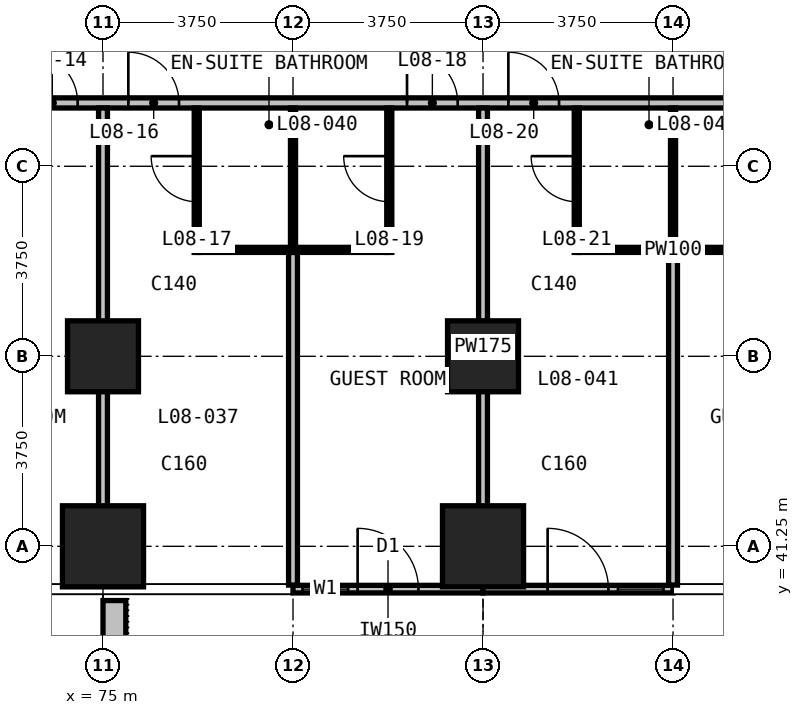
"""IFC4 building model, lengths in metres.
Left out: names, types, materials, properties, quantities, classifications, styles, units other than length and angle.
Written with IfcOpenShell. Run it as: python <this file> out.ifc"""

import sys

from ifc_helpers import new_model, si_unit, direction, frame, frame_2d, origin, origin_2d, place, context, subcontext, project, spatial, rectangle, extrude, element, fill, save


model = new_model("IFC4")
c1 = context("Model", 3, precision=1e-05, world=origin(), true_north=direction((0.0, 1.0)))
c2 = subcontext(c1, "Body", "Model", "MODEL_VIEW")
j1 = project(units=[si_unit("LENGTHUNIT", "METRE"), si_unit("PLANEANGLEUNIT", "RADIAN")], contexts=[c1])
p1 = place(None, origin())
s1 = spatial("IfcSite", under=j1, at=p1, CompositionType="ELEMENT")
p2 = place(p1, origin())
s2 = spatial("IfcBuilding", under=s1, at=p2, CompositionType="ELEMENT")
p3 = place(p2, frame((0.0, 0.0, 46.1)))
s3 = spatial("IfcBuildingStorey", under=s2, at=p3, CompositionType="ELEMENT", Elevation=46.1)
p4 = place(p3, frame((75.0, 41.25, 0.0), z_axis=(0.0, 0.0, 1.0), x_axis=(1.0, 0.0, 0.0)))
e1 = element("IfcColumn", 1, at=p4, inside=s3, PredefinedType="COLUMN", context=c2, shape_type="SweptSolid", body=[
    extrude(rectangle(XDim=1.6, YDim=1.6, at=origin_2d()), origin(), (0.0, 0.0, 1.0), 3.3),
])
p5 = place(p3, frame((75.0, 45.0, 0.0), z_axis=(0.0, 0.0, 1.0), x_axis=(1.0, 0.0, 0.0)))
e2 = element("IfcColumn", 2, at=p5, inside=s3, PredefinedType="COLUMN", context=c2, shape_type="SweptSolid", body=[
    extrude(rectangle(XDim=1.4, YDim=1.4, at=origin_2d()), origin(), (0.0, 0.0, 1.0), 3.3),
])
p6 = place(p3, frame((82.5, 41.25, 0.0), z_axis=(0.0, 0.0, 1.0), x_axis=(1.0, 0.0, 0.0)))
e3 = element("IfcColumn", 3, at=p6, inside=s3, PredefinedType="COLUMN", context=c2, shape_type="SweptSolid", body=[
    extrude(rectangle(XDim=1.6, YDim=1.6, at=origin_2d()), origin(), (0.0, 0.0, 1.0), 3.3),
])
p7 = place(p3, frame((82.5, 45.0, 0.0), z_axis=(0.0, 0.0, 1.0), x_axis=(1.0, 0.0, 0.0)))
e4 = element("IfcColumn", 4, at=p7, inside=s3, PredefinedType="COLUMN", context=c2, shape_type="SweptSolid", body=[
    extrude(rectangle(XDim=1.4, YDim=1.4, at=origin_2d()), origin(), (0.0, 0.0, 1.0), 3.3),
])
p8 = place(p3, frame((78.75, 40.405, 0.0), z_axis=(0.0, 0.0, 1.0), x_axis=(1.0, 0.0, 0.0)))
e5 = element("IfcWall", 5, at=p8, inside=s3, PredefinedType="SOLIDWALL", context=c2, shape_type="SweptSolid", body=[
    extrude(rectangle(XDim=3.75, YDim=0.15, at=frame_2d((1.875, 0.0))), origin(), (0.0, 0.0, 1.0), 3.0),
])
p9 = place(p8, frame((0.188, 0.0, 0.1)))
e6 = element("IfcOpeningElement", 6, at=p9, cuts=e5, PredefinedType="OPENING", context=c2, shape_type="SweptSolid", body=[
    extrude(rectangle(XDim=0.9, YDim=2.4, at=frame_2d((0.45, 1.2))), frame((0.0, 0.085, 0.0), z_axis=(0.0, -1.0, 0.0), x_axis=(1.0, 0.0, 0.0)), (0.0, 0.0, 1.0), 0.17),
])
p10 = place(p8, frame((1.275, 0.0, 0.0)))
e7 = element("IfcOpeningElement", 7, at=p10, cuts=e5, PredefinedType="OPENING", context=c2, shape_type="SweptSolid", body=[
    extrude(rectangle(XDim=1.2, YDim=2.4, at=frame_2d((0.6, 1.2))), frame((0.0, 0.085, 0.0), z_axis=(0.0, -1.0, 0.0), x_axis=(1.0, 0.0, 0.0)), (0.0, 0.0, 1.0), 0.17),
])
p11 = place(p3, frame((82.5, 40.405, 0.0), z_axis=(0.0, 0.0, 1.0), x_axis=(1.0, 0.0, 0.0)))
e8 = element("IfcWall", 8, at=p11, inside=s3, PredefinedType="SOLIDWALL", context=c2, shape_type="SweptSolid", body=[
    extrude(rectangle(XDim=3.75, YDim=0.15, at=frame_2d((1.875, 0.0))), origin(), (0.0, 0.0, 1.0), 3.0),
])
p12 = place(p11, frame((1.275, 0.0, 0.0)))
e9 = element("IfcOpeningElement", 9, at=p12, cuts=e8, PredefinedType="OPENING", context=c2, shape_type="SweptSolid", body=[
    extrude(rectangle(XDim=1.2, YDim=2.4, at=frame_2d((0.6, 1.2))), frame((0.0, 0.085, 0.0), z_axis=(0.0, -1.0, 0.0), x_axis=(1.0, 0.0, 0.0)), (0.0, 0.0, 1.0), 0.17),
])
p13 = place(p11, frame((2.663, 0.0, 0.1)))
e10 = element("IfcOpeningElement", 10, at=p13, cuts=e8, PredefinedType="OPENING", context=c2, shape_type="SweptSolid", body=[
    extrude(rectangle(XDim=0.9, YDim=2.4, at=frame_2d((0.45, 1.2))), frame((0.0, 0.085, 0.0), z_axis=(0.0, -1.0, 0.0), x_axis=(1.0, 0.0, 0.0)), (0.0, 0.0, 1.0), 0.17),
])
p14 = place(p3, frame((75.225, 40.18, 0.0), z_axis=(0.0, 0.0, 1.0), x_axis=(0.0, -1.0, 0.0)))
e11 = element("IfcWall", 11, at=p14, inside=s3, PredefinedType="USERDEFINED", context=c2, shape_type="SweptSolid", body=[
    extrude(rectangle(XDim=2.33, YDim=0.45, at=frame_2d((1.165, 0.0))), origin(), (0.0, 0.0, 1.0), 1.1),
])
p15 = place(p3, frame((52.575, 50.0, 0.0), z_axis=(0.0, 0.0, 1.0), x_axis=(1.0, 0.0, 0.0)))
e12 = element("IfcWall", 12, at=p15, inside=s3, PredefinedType="PARTITIONING", context=c2, shape_type="SweptSolid", body=[
    extrude(rectangle(XDim=44.85, YDim=0.2, at=frame_2d((22.425, 0.0))), origin(), (0.0, 0.0, 1.0), 3.0),
])
p16 = place(p15, frame((5.925, 0.0, 0.0)))
e13 = element("IfcOpeningElement", 13, at=p16, cuts=e12, PredefinedType="OPENING", context=c2, shape_type="SweptSolid", body=[
    extrude(rectangle(XDim=1.0, YDim=2.2, at=frame_2d((0.5, 1.1))), frame((0.0, 0.11, 0.0), z_axis=(0.0, -1.0, 0.0), x_axis=(1.0, 0.0, 0.0)), (0.0, 0.0, 1.0), 0.22),
])
p17 = place(p15, frame((7.925, 0.0, 0.0)))
e14 = element("IfcOpeningElement", 14, at=p17, cuts=e12, PredefinedType="OPENING", context=c2, shape_type="SweptSolid", body=[
    extrude(rectangle(XDim=1.0, YDim=2.2, at=frame_2d((0.5, 1.1))), frame((0.0, 0.11, 0.0), z_axis=(0.0, -1.0, 0.0), x_axis=(1.0, 0.0, 0.0)), (0.0, 0.0, 1.0), 0.22),
])
p18 = place(p15, frame((13.425, 0.0, 0.0)))
e15 = element("IfcOpeningElement", 15, at=p18, cuts=e12, PredefinedType="OPENING", context=c2, shape_type="SweptSolid", body=[
    extrude(rectangle(XDim=1.0, YDim=2.2, at=frame_2d((0.5, 1.1))), frame((0.0, 0.11, 0.0), z_axis=(0.0, -1.0, 0.0), x_axis=(1.0, 0.0, 0.0)), (0.0, 0.0, 1.0), 0.22),
])
p19 = place(p15, frame((15.425, 0.0, 0.0)))
e16 = element("IfcOpeningElement", 16, at=p19, cuts=e12, PredefinedType="OPENING", context=c2, shape_type="SweptSolid", body=[
    extrude(rectangle(XDim=1.0, YDim=2.2, at=frame_2d((0.5, 1.1))), frame((0.0, 0.11, 0.0), z_axis=(0.0, -1.0, 0.0), x_axis=(1.0, 0.0, 0.0)), (0.0, 0.0, 1.0), 0.22),
])
p20 = place(p15, frame((20.925, 0.0, 0.0)))
e17 = element("IfcOpeningElement", 17, at=p20, cuts=e12, PredefinedType="OPENING", context=c2, shape_type="SweptSolid", body=[
    extrude(rectangle(XDim=1.0, YDim=2.2, at=frame_2d((0.5, 1.1))), frame((0.0, 0.11, 0.0), z_axis=(0.0, -1.0, 0.0), x_axis=(1.0, 0.0, 0.0)), (0.0, 0.0, 1.0), 0.22),
])
p21 = place(p15, frame((22.925, 0.0, 0.0)))
e18 = element("IfcOpeningElement", 18, at=p21, cuts=e12, PredefinedType="OPENING", context=c2, shape_type="SweptSolid", body=[
    extrude(rectangle(XDim=1.0, YDim=2.2, at=frame_2d((0.5, 1.1))), frame((0.0, 0.11, 0.0), z_axis=(0.0, -1.0, 0.0), x_axis=(1.0, 0.0, 0.0)), (0.0, 0.0, 1.0), 0.22),
])
p22 = place(p15, frame((28.425, 0.0, 0.0)))
e19 = element("IfcOpeningElement", 19, at=p22, cuts=e12, PredefinedType="OPENING", context=c2, shape_type="SweptSolid", body=[
    extrude(rectangle(XDim=1.0, YDim=2.2, at=frame_2d((0.5, 1.1))), frame((0.0, 0.11, 0.0), z_axis=(0.0, -1.0, 0.0), x_axis=(1.0, 0.0, 0.0)), (0.0, 0.0, 1.0), 0.22),
])
p23 = place(p15, frame((30.425, 0.0, 0.0)))
e20 = element("IfcOpeningElement", 20, at=p23, cuts=e12, PredefinedType="OPENING", context=c2, shape_type="SweptSolid", body=[
    extrude(rectangle(XDim=1.0, YDim=2.2, at=frame_2d((0.5, 1.1))), frame((0.0, 0.11, 0.0), z_axis=(0.0, -1.0, 0.0), x_axis=(1.0, 0.0, 0.0)), (0.0, 0.0, 1.0), 0.22),
])
p24 = place(p15, frame((35.925, 0.0, 0.0)))
e21 = element("IfcOpeningElement", 21, at=p24, cuts=e12, PredefinedType="OPENING", context=c2, shape_type="SweptSolid", body=[
    extrude(rectangle(XDim=1.0, YDim=2.2, at=frame_2d((0.5, 1.1))), frame((0.0, 0.11, 0.0), z_axis=(0.0, -1.0, 0.0), x_axis=(1.0, 0.0, 0.0)), (0.0, 0.0, 1.0), 0.22),
])
p25 = place(p15, frame((37.925, 0.0, 0.0)))
e22 = element("IfcOpeningElement", 22, at=p25, cuts=e12, PredefinedType="OPENING", context=c2, shape_type="SweptSolid", body=[
    extrude(rectangle(XDim=1.0, YDim=2.2, at=frame_2d((0.5, 1.1))), frame((0.0, 0.11, 0.0), z_axis=(0.0, -1.0, 0.0), x_axis=(1.0, 0.0, 0.0)), (0.0, 0.0, 1.0), 0.22),
])
p26 = place(p15, frame((1.4, 0.0, 0.0)))
e23 = element("IfcOpeningElement", 23, at=p26, cuts=e12, PredefinedType="OPENING", context=c2, shape_type="SweptSolid", body=[
    extrude(rectangle(XDim=0.9, YDim=2.2, at=frame_2d((0.45, 1.1))), frame((0.0, 0.11, 0.0), z_axis=(0.0, -1.0, 0.0), x_axis=(1.0, 0.0, 0.0)), (0.0, 0.0, 1.0), 0.22),
])
p27 = place(p15, frame((42.575, 0.0, 0.0)))
e24 = element("IfcOpeningElement", 24, at=p27, cuts=e12, PredefinedType="OPENING", context=c2, shape_type="SweptSolid", body=[
    extrude(rectangle(XDim=0.9, YDim=2.2, at=frame_2d((0.45, 1.1))), frame((0.0, 0.11, 0.0), z_axis=(0.0, -1.0, 0.0), x_axis=(1.0, 0.0, 0.0)), (0.0, 0.0, 1.0), 0.22),
])
p28 = place(p3, frame((75.0, 40.485, 0.0), z_axis=(0.0, 0.0, 1.0), x_axis=(0.0, 1.0, 0.0)))
e25 = element("IfcWall", 25, at=p28, inside=s3, PredefinedType="PARTITIONING", context=c2, shape_type="SweptSolid", body=[
    extrude(rectangle(XDim=9.415, YDim=0.175, at=frame_2d((4.708, 0.0))), origin(), (0.0, 0.0, 1.0), 3.0),
])
p29 = place(p3, frame((78.75, 40.485, 0.0), z_axis=(0.0, 0.0, 1.0), x_axis=(0.0, 1.0, 0.0)))
e26 = element("IfcWall", 26, at=p29, inside=s3, PredefinedType="PARTITIONING", context=c2, shape_type="SweptSolid", body=[
    extrude(rectangle(XDim=6.565, YDim=0.175, at=frame_2d((3.282, 0.0))), origin(), (0.0, 0.0, 1.0), 3.0),
])
p30 = place(p3, frame((82.5, 40.485, 0.0), z_axis=(0.0, 0.0, 1.0), x_axis=(0.0, 1.0, 0.0)))
e27 = element("IfcWall", 27, at=p30, inside=s3, PredefinedType="PARTITIONING", context=c2, shape_type="SweptSolid", body=[
    extrude(rectangle(XDim=9.415, YDim=0.175, at=frame_2d((4.708, 0.0))), origin(), (0.0, 0.0, 1.0), 3.0),
])
p31 = place(p3, frame((86.25, 40.485, 0.0), z_axis=(0.0, 0.0, 1.0), x_axis=(0.0, 1.0, 0.0)))
e28 = element("IfcWall", 28, at=p31, inside=s3, PredefinedType="PARTITIONING", context=c2, shape_type="SweptSolid", body=[
    extrude(rectangle(XDim=6.565, YDim=0.175, at=frame_2d((3.282, 0.0))), origin(), (0.0, 0.0, 1.0), 3.0),
])
for number, where, z_axis, x_axis in (
    (29, (76.9, 47.1, 0.0), (0.0, 0.0, 1.0), (1.0, 0.0, 0.0)),
    (30, (84.4, 47.1, 0.0), (0.0, 0.0, 1.0), (1.0, 0.0, 0.0)),
):
    element("IfcWall", number, at=place(p3, frame(where, z_axis=z_axis, x_axis=x_axis)), inside=s3, PredefinedType="PARTITIONING", context=c2, shape_type="SweptSolid", body=[
        extrude(rectangle(XDim=3.7, YDim=0.1, at=frame_2d((1.85, 0.0))), origin(), (0.0, 0.0, 1.0), 3.0),
    ])
p32 = place(p3, frame((76.85, 47.05, 0.0), z_axis=(0.0, 0.0, 1.0), x_axis=(0.0, 1.0, 0.0)))
e31 = element("IfcWall", 31, at=p32, inside=s3, PredefinedType="PARTITIONING", context=c2, shape_type="SweptSolid", body=[
    extrude(rectangle(XDim=2.85, YDim=0.1, at=frame_2d((1.425, 0.0))), origin(), (0.0, 0.0, 1.0), 3.0),
])
p33 = place(p32, frame((1.0, 0.0, 0.0)))
e32 = element("IfcOpeningElement", 32, at=p33, cuts=e31, PredefinedType="OPENING", context=c2, shape_type="SweptSolid", body=[
    extrude(rectangle(XDim=0.9, YDim=2.2, at=frame_2d((0.45, 1.1))), frame((0.0, 0.06, 0.0), z_axis=(0.0, -1.0, 0.0), x_axis=(1.0, 0.0, 0.0)), (0.0, 0.0, 1.0), 0.12),
])
p34 = place(p3, frame((78.75, 47.15, 0.0), z_axis=(0.0, 0.0, 1.0), x_axis=(0.0, 1.0, 0.0)))
e33 = element("IfcWall", 33, at=p34, inside=s3, PredefinedType="PARTITIONING", context=c2, shape_type="SweptSolid", body=[
    extrude(rectangle(XDim=2.75, YDim=0.1, at=frame_2d((1.375, 0.0))), origin(), (0.0, 0.0, 1.0), 3.0),
])
p35 = place(p3, frame((80.65, 47.05, 0.0), z_axis=(0.0, 0.0, 1.0), x_axis=(0.0, 1.0, 0.0)))
e34 = element("IfcWall", 34, at=p35, inside=s3, PredefinedType="PARTITIONING", context=c2, shape_type="SweptSolid", body=[
    extrude(rectangle(XDim=2.85, YDim=0.1, at=frame_2d((1.425, 0.0))), origin(), (0.0, 0.0, 1.0), 3.0),
])
p36 = place(p35, frame((1.0, 0.0, 0.0)))
e35 = element("IfcOpeningElement", 35, at=p36, cuts=e34, PredefinedType="OPENING", context=c2, shape_type="SweptSolid", body=[
    extrude(rectangle(XDim=0.9, YDim=2.2, at=frame_2d((0.45, 1.1))), frame((0.0, 0.06, 0.0), z_axis=(0.0, -1.0, 0.0), x_axis=(1.0, 0.0, 0.0)), (0.0, 0.0, 1.0), 0.12),
])
p37 = place(p3, frame((84.35, 47.05, 0.0), z_axis=(0.0, 0.0, 1.0), x_axis=(0.0, 1.0, 0.0)))
e36 = element("IfcWall", 36, at=p37, inside=s3, PredefinedType="PARTITIONING", context=c2, shape_type="SweptSolid", body=[
    extrude(rectangle(XDim=2.85, YDim=0.1, at=frame_2d((1.425, 0.0))), origin(), (0.0, 0.0, 1.0), 3.0),
])
p38 = place(p37, frame((1.0, 0.0, 0.0)))
e37 = element("IfcOpeningElement", 37, at=p38, cuts=e36, PredefinedType="OPENING", context=c2, shape_type="SweptSolid", body=[
    extrude(rectangle(XDim=0.9, YDim=2.2, at=frame_2d((0.45, 1.1))), frame((0.0, 0.06, 0.0), z_axis=(0.0, -1.0, 0.0), x_axis=(1.0, 0.0, 0.0)), (0.0, 0.0, 1.0), 0.12),
])
p39 = place(p3, frame((86.25, 47.15, 0.0), z_axis=(0.0, 0.0, 1.0), x_axis=(0.0, 1.0, 0.0)))
e38 = element("IfcWall", 38, at=p39, inside=s3, PredefinedType="PARTITIONING", context=c2, shape_type="SweptSolid", body=[
    extrude(rectangle(XDim=2.75, YDim=0.1, at=frame_2d((1.375, 0.0))), origin(), (0.0, 0.0, 1.0), 3.0),
])
p40 = place(p9, origin())
e39 = element("IfcWindow", 39, at=p40, inside=s3, PartitioningType="SINGLE_PANEL", PredefinedType="WINDOW", context=c2, shape_type="SweptSolid", body=[
    extrude(rectangle(XDim=0.9, YDim=2.4, at=frame_2d((0.45, 1.2))), frame((0.0, 0.03, 0.0), z_axis=(0.0, -1.0, 0.0), x_axis=(1.0, 0.0, 0.0)), (0.0, 0.0, 1.0), 0.06),
])
fill(e6, e39)
p41 = place(p10, origin())
e40 = element("IfcDoor", 40, at=p41, inside=s3, OperationType="SINGLE_SWING_LEFT", PredefinedType="DOOR", context=c2, shape_type="SweptSolid", body=[
    extrude(rectangle(XDim=1.2, YDim=2.4, at=frame_2d((0.6, 1.2))), frame((0.0, 0.025, 0.0), z_axis=(0.0, -1.0, 0.0), x_axis=(1.0, 0.0, 0.0)), (0.0, 0.0, 1.0), 0.05),
])
fill(e7, e40)
p42 = place(p12, origin())
e41 = element("IfcDoor", 41, at=p42, inside=s3, OperationType="SINGLE_SWING_LEFT", PredefinedType="DOOR", context=c2, shape_type="SweptSolid", body=[
    extrude(rectangle(XDim=1.2, YDim=2.4, at=frame_2d((0.6, 1.2))), frame((0.0, 0.025, 0.0), z_axis=(0.0, -1.0, 0.0), x_axis=(1.0, 0.0, 0.0)), (0.0, 0.0, 1.0), 0.05),
])
fill(e9, e41)
p43 = place(p13, origin())
e42 = element("IfcWindow", 42, at=p43, inside=s3, PartitioningType="SINGLE_PANEL", PredefinedType="WINDOW", context=c2, shape_type="SweptSolid", body=[
    extrude(rectangle(XDim=0.9, YDim=2.4, at=frame_2d((0.45, 1.2))), frame((0.0, 0.03, 0.0), z_axis=(0.0, -1.0, 0.0), x_axis=(1.0, 0.0, 0.0)), (0.0, 0.0, 1.0), 0.06),
])
fill(e10, e42)
p44 = place(p20, origin())
e43 = element("IfcDoor", 43, at=p44, inside=s3, OperationType="SINGLE_SWING_LEFT", PredefinedType="DOOR", context=c2, shape_type="SweptSolid", body=[
    extrude(rectangle(XDim=1.0, YDim=2.2, at=frame_2d((0.5, 1.1))), frame((0.0, 0.025, 0.0), z_axis=(0.0, -1.0, 0.0), x_axis=(1.0, 0.0, 0.0)), (0.0, 0.0, 1.0), 0.05),
])
fill(e17, e43)
p45 = place(p21, origin())
e44 = element("IfcDoor", 44, at=p45, inside=s3, OperationType="SINGLE_SWING_LEFT", PredefinedType="DOOR", context=c2, shape_type="SweptSolid", body=[
    extrude(rectangle(XDim=1.0, YDim=2.2, at=frame_2d((0.5, 1.1))), frame((0.0, 0.025, 0.0), z_axis=(0.0, -1.0, 0.0), x_axis=(1.0, 0.0, 0.0)), (0.0, 0.0, 1.0), 0.05),
])
fill(e18, e44)
p46 = place(p33, origin())
e45 = element("IfcDoor", 45, at=p46, inside=s3, OperationType="SINGLE_SWING_RIGHT", PredefinedType="DOOR", context=c2, shape_type="SweptSolid", body=[
    extrude(rectangle(XDim=0.9, YDim=2.2, at=frame_2d((0.45, 1.1))), frame((0.0, 0.025, 0.0), z_axis=(0.0, -1.0, 0.0), x_axis=(1.0, 0.0, 0.0)), (0.0, 0.0, 1.0), 0.05),
])
fill(e32, e45)
p47 = place(p22, origin())
e46 = element("IfcDoor", 46, at=p47, inside=s3, OperationType="SINGLE_SWING_LEFT", PredefinedType="DOOR", context=c2, shape_type="SweptSolid", body=[
    extrude(rectangle(XDim=1.0, YDim=2.2, at=frame_2d((0.5, 1.1))), frame((0.0, 0.025, 0.0), z_axis=(0.0, -1.0, 0.0), x_axis=(1.0, 0.0, 0.0)), (0.0, 0.0, 1.0), 0.05),
])
fill(e19, e46)
p48 = place(p36, origin())
e47 = element("IfcDoor", 47, at=p48, inside=s3, OperationType="SINGLE_SWING_RIGHT", PredefinedType="DOOR", context=c2, shape_type="SweptSolid", body=[
    extrude(rectangle(XDim=0.9, YDim=2.2, at=frame_2d((0.45, 1.1))), frame((0.0, 0.025, 0.0), z_axis=(0.0, -1.0, 0.0), x_axis=(1.0, 0.0, 0.0)), (0.0, 0.0, 1.0), 0.05),
])
fill(e35, e47)
p49 = place(p23, origin())
e48 = element("IfcDoor", 48, at=p49, inside=s3, OperationType="SINGLE_SWING_RIGHT", PredefinedType="DOOR", context=c2, shape_type="SweptSolid", body=[
    extrude(rectangle(XDim=1.0, YDim=2.2, at=frame_2d((0.5, 1.1))), frame((0.0, 0.025, 0.0), z_axis=(0.0, -1.0, 0.0), x_axis=(1.0, 0.0, 0.0)), (0.0, 0.0, 1.0), 0.05),
])
fill(e20, e48)
p50 = place(p38, origin())
e49 = element("IfcDoor", 49, at=p50, inside=s3, OperationType="SINGLE_SWING_RIGHT", PredefinedType="DOOR", context=c2, shape_type="SweptSolid", body=[
    extrude(rectangle(XDim=0.9, YDim=2.2, at=frame_2d((0.45, 1.1))), frame((0.0, 0.025, 0.0), z_axis=(0.0, -1.0, 0.0), x_axis=(1.0, 0.0, 0.0)), (0.0, 0.0, 1.0), 0.05),
])
fill(e37, e49)
save(model, sys.argv[1])
